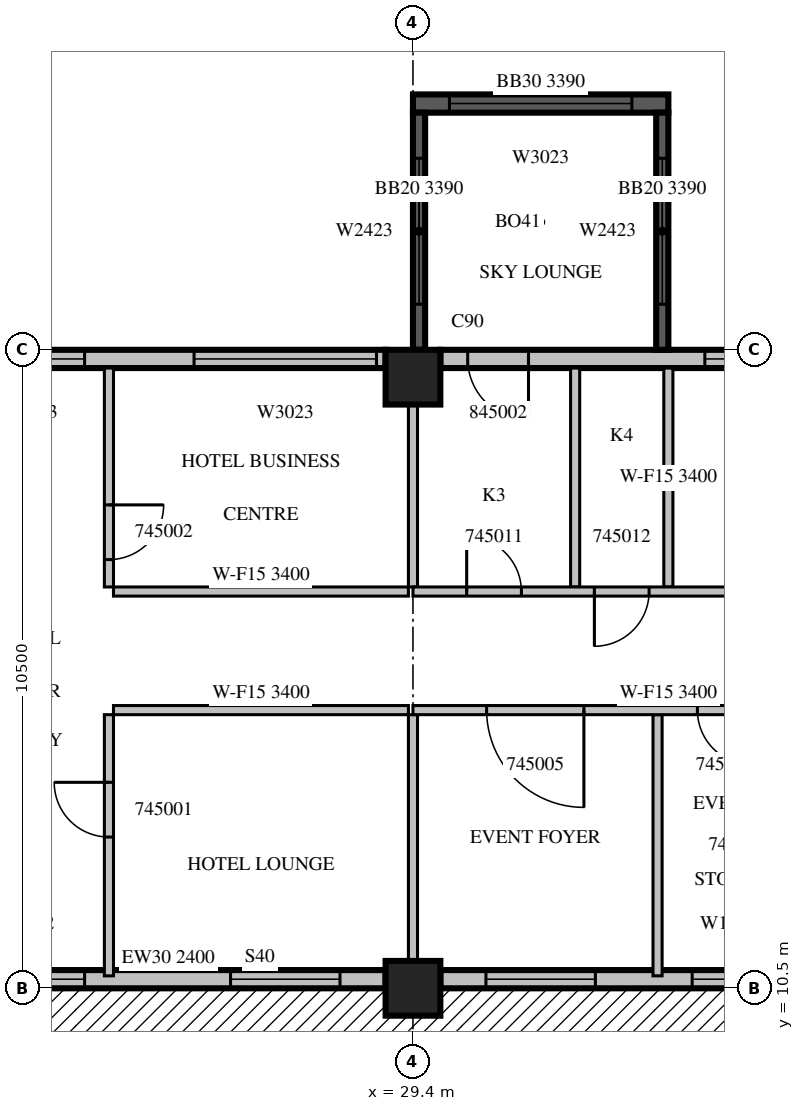
"""IFC4 building model, lengths in metres.
Left out: names, types, materials, properties, quantities, classifications, styles, units other than length and angle.
Written with IfcOpenShell. Run it as: python <this file> out.ifc"""

import sys

from ifc_helpers import new_model, si_unit, direction, frame, frame_2d, origin, origin_2d, place, context, subcontext, project, spatial, rectangle, extrude, source, transform, mapped, element, fill, save


model = new_model("IFC4")
c1 = context("Model", 3, precision=1e-05, world=origin(), true_north=direction((0.0, 1.0)))
c2 = subcontext(c1, "Body", "Model", "MODEL_VIEW")
j1 = project(units=[si_unit("LENGTHUNIT", "METRE"), si_unit("PLANEANGLEUNIT", "RADIAN")], contexts=[c1])
p1 = place(None, origin())
s1 = spatial("IfcSite", under=j1, at=p1, CompositionType="ELEMENT")
p2 = place(p1, origin())
s2 = spatial("IfcBuilding", under=s1, at=p2, CompositionType="ELEMENT")
p3 = place(p2, frame((0.0, 0.0, 204.4)))
s3 = spatial("IfcBuildingStorey", under=s2, at=p3, CompositionType="ELEMENT", Elevation=204.4)
m1 = source(origin(), c2, "Body", "SweptSolid", [
    extrude(rectangle(XDim=0.9, YDim=0.9, at=origin_2d()), origin(), (0.0, 0.0, 1.0), 3.8),
])
for number, where, z_axis, x_axis in (
    (1, (29.4, 10.5, 0.0), (0.0, 0.0, 1.0), (1.0, 0.0, 0.0)),
    (2, (29.4, 20.55, 0.0), (0.0, 0.0, 1.0), (1.0, 0.0, 0.0)),
):
    element("IfcColumn", number, at=place(p3, frame(where, z_axis=z_axis, x_axis=x_axis)), inside=s3, PredefinedType="COLUMN", context=c2, shape_type="MappedRepresentation", body=[
        mapped(m1, transform((0.0, 0.0, 0.0), scale=1.0)),
    ])
p4 = place(p3, frame((21.8, 10.65, 0.0), z_axis=(0.0, 0.0, 1.0), x_axis=(1.0, 0.0, 0.0)))
e3 = element("IfcWall", 3, at=p4, inside=s3, PredefinedType="STANDARD", context=c2, shape_type="SweptSolid", body=[
    extrude(rectangle(XDim=7.15, YDim=0.3, at=frame_2d((3.575, 0.0))), origin(), (0.0, 0.0, 1.0), 2.4),
])
m2 = source(origin(), c2, "Body", "SweptSolid", [
    extrude(rectangle(XDim=1.8, YDim=2.4, at=frame_2d((0.9, 1.2))), frame((0.0, 0.16, 0.0), z_axis=(0.0, -1.0, 0.0), x_axis=(1.0, 0.0, 0.0)), (0.0, 0.0, 1.0), 0.32),
])
p5 = place(p4, frame((0.4, 0.0, 0.0)))
e4 = element("IfcOpeningElement", 4, at=p5, cuts=e3, PredefinedType="OPENING", context=c2, shape_type="MappedRepresentation", body=[
    mapped(m2, transform((0.0, 0.0, 0.0), scale=1.0)),
])
p6 = place(p4, frame((4.6, 0.0, 0.0)))
e5 = element("IfcOpeningElement", 5, at=p6, cuts=e3, PredefinedType="OPENING", context=c2, shape_type="MappedRepresentation", body=[
    mapped(m2, transform((0.0, 0.0, 0.0), scale=1.0)),
])
m3 = source(origin(), c2, "Body", "SweptSolid", [
    extrude(rectangle(XDim=7.5, YDim=0.3, at=frame_2d((3.75, 0.0))), origin(), (0.0, 0.0, 1.0), 3.4),
])
p7 = place(p3, frame((29.85, 10.65, 0.0), z_axis=(0.0, 0.0, 1.0), x_axis=(1.0, 0.0, 0.0)))
e6 = element("IfcWall", 6, at=p7, inside=s3, PredefinedType="STANDARD", context=c2, shape_type="MappedRepresentation", body=[
    mapped(m3, transform((0.0, 0.0, 0.0), scale=1.0)),
])
p8 = place(p7, frame((0.75, 0.0, 0.0)))
e7 = element("IfcOpeningElement", 7, at=p8, cuts=e6, PredefinedType="OPENING", context=c2, shape_type="MappedRepresentation", body=[
    mapped(m2, transform((0.0, 0.0, 0.0), scale=1.0)),
])
m4 = source(origin(), c2, "Body", "SweptSolid", [
    extrude(rectangle(XDim=1.2, YDim=2.3, at=frame_2d((0.6, 1.15))), frame((0.0, 0.16, 0.0), z_axis=(0.0, -1.0, 0.0), x_axis=(1.0, 0.0, 0.0)), (0.0, 0.0, 1.0), 0.32),
])
p9 = place(p7, frame((4.141, 0.0, 0.6)))
e8 = element("IfcOpeningElement", 8, at=p9, cuts=e6, PredefinedType="OPENING", context=c2, shape_type="MappedRepresentation", body=[
    mapped(m4, transform((0.0, 0.0, 0.0), scale=1.0)),
])
p10 = place(p3, frame((37.35, 20.85, 0.0), z_axis=(0.0, 0.0, 1.0), x_axis=(-1.0, 0.0, 0.0)))
e9 = element("IfcWall", 9, at=p10, inside=s3, PredefinedType="STANDARD", context=c2, shape_type="MappedRepresentation", body=[
    mapped(m3, transform((0.0, 0.0, 0.0), scale=1.0)),
])
m5 = source(origin(), c2, "Body", "SweptSolid", [
    extrude(rectangle(XDim=3.0, YDim=2.3, at=frame_2d((1.5, 1.15))), frame((0.0, 0.16, 0.0), z_axis=(0.0, -1.0, 0.0), x_axis=(1.0, 0.0, 0.0)), (0.0, 0.0, 1.0), 0.32),
])
p11 = place(p10, frame((0.15, 0.0, 0.6)))
e10 = element("IfcOpeningElement", 10, at=p11, cuts=e9, PredefinedType="OPENING", context=c2, shape_type="MappedRepresentation", body=[
    mapped(m5, transform((0.0, 0.0, 0.0), scale=1.0)),
])
m6 = source(origin(), c2, "Body", "SweptSolid", [
    extrude(rectangle(XDim=1.0, YDim=2.1, at=frame_2d((0.5, 1.05))), frame((0.0, 0.16, 0.0), z_axis=(0.0, -1.0, 0.0), x_axis=(1.0, 0.0, 0.0)), (0.0, 0.0, 1.0), 0.32),
])
p12 = place(p10, frame((6.05, 0.0, 0.0)))
e11 = element("IfcOpeningElement", 11, at=p12, cuts=e9, PredefinedType="OPENING", context=c2, shape_type="MappedRepresentation", body=[
    mapped(m6, transform((0.0, 0.0, 0.0), scale=1.0)),
])
m7 = source(origin(), c2, "Body", "SweptSolid", [
    extrude(rectangle(XDim=7.15, YDim=0.3, at=frame_2d((3.575, 0.0))), origin(), (0.0, 0.0, 1.0), 3.4),
])
p13 = place(p3, frame((28.95, 20.85, 0.0), z_axis=(0.0, 0.0, 1.0), x_axis=(-1.0, 0.0, 0.0)))
e12 = element("IfcWall", 12, at=p13, inside=s3, PredefinedType="STANDARD", context=c2, shape_type="MappedRepresentation", body=[
    mapped(m7, transform((0.0, 0.0, 0.0), scale=1.0)),
])
p14 = place(p13, frame((0.15, 0.0, 0.6)))
e13 = element("IfcOpeningElement", 13, at=p14, cuts=e12, PredefinedType="OPENING", context=c2, shape_type="MappedRepresentation", body=[
    mapped(m5, transform((0.0, 0.0, 0.0), scale=1.0)),
])
m8 = source(origin(), c2, "Body", "SweptSolid", [
    extrude(rectangle(XDim=1.8, YDim=2.3, at=frame_2d((0.9, 1.15))), frame((0.0, 0.16, 0.0), z_axis=(0.0, -1.0, 0.0), x_axis=(1.0, 0.0, 0.0)), (0.0, 0.0, 1.0), 0.32),
])
p15 = place(p13, frame((4.95, 0.0, 0.6)))
e14 = element("IfcOpeningElement", 14, at=p15, cuts=e12, PredefinedType="OPENING", context=c2, shape_type="MappedRepresentation", body=[
    mapped(m8, transform((0.0, 0.0, 0.0), scale=1.0)),
])
m9 = source(origin(), c2, "Body", "SweptSolid", [
    extrude(rectangle(XDim=4.2, YDim=0.3, at=frame_2d((2.1, 0.0))), origin(), (0.0, 0.0, 1.0), 3.39),
])
p16 = place(p3, frame((33.6, 25.05, 0.0), z_axis=(0.0, 0.0, 1.0), x_axis=(-1.0, 0.0, 0.0)))
e15 = element("IfcWall", 15, at=p16, inside=s3, PredefinedType="SOLIDWALL", context=c2, shape_type="MappedRepresentation", body=[
    mapped(m9, transform((0.0, 0.0, 0.0), scale=1.0)),
])
p17 = place(p16, frame((0.6, 0.0, 0.6)))
e16 = element("IfcOpeningElement", 16, at=p17, cuts=e15, PredefinedType="OPENING", context=c2, shape_type="MappedRepresentation", body=[
    mapped(m5, transform((0.0, 0.0, 0.0), scale=1.0)),
])
m10 = source(origin(), c2, "Body", "SweptSolid", [
    extrude(rectangle(XDim=3.9, YDim=0.2, at=frame_2d((1.95, 0.0))), origin(), (0.0, 0.0, 1.0), 3.39),
])
p18 = place(p3, frame((33.5, 21.0, 0.0), z_axis=(0.0, 0.0, 1.0), x_axis=(0.0, 1.0, 0.0)))
e17 = element("IfcWall", 17, at=p18, inside=s3, PredefinedType="SOLIDWALL", context=c2, shape_type="MappedRepresentation", body=[
    mapped(m10, transform((0.0, 0.0, 0.0), scale=1.0)),
])
m11 = source(origin(), c2, "Body", "SweptSolid", [
    extrude(rectangle(XDim=2.4, YDim=2.3, at=frame_2d((1.2, 1.15))), frame((0.0, 0.11, 0.0), z_axis=(0.0, -1.0, 0.0), x_axis=(1.0, 0.0, 0.0)), (0.0, 0.0, 1.0), 0.22),
])
p19 = place(p18, frame((0.75, 0.0, 0.6)))
e18 = element("IfcOpeningElement", 18, at=p19, cuts=e17, PredefinedType="OPENING", context=c2, shape_type="MappedRepresentation", body=[
    mapped(m11, transform((0.0, 0.0, 0.0), scale=1.0)),
])
p20 = place(p3, frame((29.5, 21.0, 0.0), z_axis=(0.0, 0.0, 1.0), x_axis=(0.0, 1.0, 0.0)))
e19 = element("IfcWall", 19, at=p20, inside=s3, PredefinedType="SOLIDWALL", context=c2, shape_type="MappedRepresentation", body=[
    mapped(m10, transform((0.0, 0.0, 0.0), scale=1.0)),
])
p21 = place(p20, frame((0.75, 0.0, 0.6)))
e20 = element("IfcOpeningElement", 20, at=p21, cuts=e19, PredefinedType="OPENING", context=c2, shape_type="MappedRepresentation", body=[
    mapped(m11, transform((0.0, 0.0, 0.0), scale=1.0)),
])
m12 = source(origin(), c2, "Body", "SweptSolid", [
    extrude(rectangle(XDim=4.295, YDim=0.15, at=frame_2d((2.147, 0.0))), origin(), (0.0, 0.0, 1.0), 3.4),
])
p22 = place(p3, frame((24.4, 15.0, 0.0), z_axis=(0.0, 0.0, 1.0), x_axis=(0.0, -1.0, 0.0)))
e21 = element("IfcWall", 21, at=p22, inside=s3, PredefinedType="PARTITIONING", context=c2, shape_type="MappedRepresentation", body=[
    mapped(m12, transform((0.0, 0.0, 0.0), scale=1.0)),
])
m13 = source(origin(), c2, "Body", "SweptSolid", [
    extrude(rectangle(XDim=0.9, YDim=2.1, at=frame_2d((0.45, 1.05))), frame((0.0, 0.085, 0.0), z_axis=(0.0, -1.0, 0.0), x_axis=(1.0, 0.0, 0.0)), (0.0, 0.0, 1.0), 0.17),
])
p23 = place(p22, frame((1.113, 0.0, 0.0)))
e22 = element("IfcOpeningElement", 22, at=p23, cuts=e21, PredefinedType="OPENING", context=c2, shape_type="MappedRepresentation", body=[
    mapped(m13, transform((0.0, 0.0, 0.0), scale=1.0)),
])
m14 = source(origin(), c2, "Body", "SweptSolid", [
    extrude(rectangle(XDim=3.6, YDim=0.15, at=frame_2d((1.8, 0.0))), origin(), (0.0, 0.0, 1.0), 3.4),
])
p24 = place(p3, frame((24.4, 20.7, 0.0), z_axis=(0.0, 0.0, 1.0), x_axis=(0.0, -1.0, 0.0)))
e23 = element("IfcWall", 23, at=p24, inside=s3, PredefinedType="PARTITIONING", context=c2, shape_type="MappedRepresentation", body=[
    mapped(m14, transform((0.0, 0.0, 0.0), scale=1.0)),
])
p25 = place(p24, frame((2.25, 0.0, 0.0)))
e24 = element("IfcOpeningElement", 24, at=p25, cuts=e23, PredefinedType="OPENING", context=c2, shape_type="MappedRepresentation", body=[
    mapped(m13, transform((0.0, 0.0, 0.0), scale=1.0)),
])
m15 = source(origin(), c2, "Body", "SweptSolid", [
    extrude(rectangle(XDim=4.85, YDim=0.15, at=frame_2d((2.425, 0.0))), origin(), (0.0, 0.0, 1.0), 3.4),
])
for number, where, z_axis, x_axis in (
    (25, (29.325, 15.075, 0.0), (0.0, 0.0, 1.0), (-1.0, 0.0, 0.0)),
    (26, (24.475, 17.025, 0.0), (0.0, 0.0, 1.0), (1.0, 0.0, 0.0)),
):
    element("IfcWall", number, at=place(p3, frame(where, z_axis=z_axis, x_axis=x_axis)), inside=s3, PredefinedType="PARTITIONING", context=c2, shape_type="MappedRepresentation", body=[
        mapped(m15, transform((0.0, 0.0, 0.0), scale=1.0)),
    ])
m16 = source(origin(), c2, "Body", "SweptSolid", [
    extrude(rectangle(XDim=4.051, YDim=0.15, at=frame_2d((2.026, 0.0))), origin(), (0.0, 0.0, 1.0), 3.4),
])
p26 = place(p3, frame((29.4, 10.949, 0.0), z_axis=(0.0, 0.0, 1.0), x_axis=(0.0, 1.0, 0.0)))
e27 = element("IfcWall", 27, at=p26, inside=s3, PredefinedType="PARTITIONING", context=c2, shape_type="MappedRepresentation", body=[
    mapped(m16, transform((0.0, 0.0, 0.0), scale=1.0)),
])
m17 = source(origin(), c2, "Body", "SweptSolid", [
    extrude(rectangle(XDim=3.001, YDim=0.15, at=frame_2d((1.5, 0.0))), origin(), (0.0, 0.0, 1.0), 3.4),
])
p27 = place(p3, frame((29.4, 17.1, 0.0), z_axis=(0.0, 0.0, 1.0), x_axis=(0.0, 1.0, 0.0)))
e28 = element("IfcWall", 28, at=p27, inside=s3, PredefinedType="PARTITIONING", context=c2, shape_type="MappedRepresentation", body=[
    mapped(m17, transform((0.0, 0.0, 0.0), scale=1.0)),
])
p28 = place(p3, frame((33.422, 10.705, 0.0), z_axis=(0.0, 0.0, 1.0), x_axis=(0.0, 1.0, 0.0)))
e29 = element("IfcWall", 29, at=p28, inside=s3, PredefinedType="PARTITIONING", context=c2, shape_type="MappedRepresentation", body=[
    mapped(m12, transform((0.0, 0.0, 0.0), scale=1.0)),
])
for number, where, z_axis, x_axis in (
    (30, (32.067, 20.7, 0.0), (0.0, 0.0, 1.0), (0.0, -1.0, 0.0)),
    (31, (33.6, 17.1, 0.0), (0.0, 0.0, 1.0), (0.0, 1.0, 0.0)),
):
    element("IfcWall", number, at=place(p3, frame(where, z_axis=z_axis, x_axis=x_axis)), inside=s3, PredefinedType="PARTITIONING", context=c2, shape_type="MappedRepresentation", body=[
        mapped(m14, transform((0.0, 0.0, 0.0), scale=1.0)),
    ])
m18 = source(origin(), c2, "Body", "SweptSolid", [
    extrude(rectangle(XDim=8.4, YDim=0.15, at=frame_2d((4.2, 0.0))), origin(), (0.0, 0.0, 1.0), 3.4),
])
p29 = place(p3, frame((37.8, 15.075, 0.0), z_axis=(0.0, 0.0, 1.0), x_axis=(-1.0, 0.0, 0.0)))
e32 = element("IfcWall", 32, at=p29, inside=s3, PredefinedType="PARTITIONING", context=c2, shape_type="MappedRepresentation", body=[
    mapped(m18, transform((0.0, 0.0, 0.0), scale=1.0)),
])
m19 = source(origin(), c2, "Body", "SweptSolid", [
    extrude(rectangle(XDim=1.6, YDim=2.1, at=frame_2d((0.8, 1.05))), frame((0.0, 0.085, 0.0), z_axis=(0.0, -1.0, 0.0), x_axis=(1.0, 0.0, 0.0)), (0.0, 0.0, 1.0), 0.17),
])
p30 = place(p29, frame((5.589, 0.0, 0.0)))
e33 = element("IfcOpeningElement", 33, at=p30, cuts=e32, PredefinedType="OPENING", context=c2, shape_type="MappedRepresentation", body=[
    mapped(m19, transform((0.0, 0.0, 0.0), scale=1.0)),
])
p31 = place(p29, frame((2.822, 0.0, 0.0)))
e34 = element("IfcOpeningElement", 34, at=p31, cuts=e32, PredefinedType="OPENING", context=c2, shape_type="MappedRepresentation", body=[
    mapped(m13, transform((0.0, 0.0, 0.0), scale=1.0)),
])
p32 = place(p3, frame((29.4, 17.025, 0.0), z_axis=(0.0, 0.0, 1.0), x_axis=(1.0, 0.0, 0.0)))
e35 = element("IfcWall", 35, at=p32, inside=s3, PredefinedType="PARTITIONING", context=c2, shape_type="SweptSolid", body=[
    extrude(rectangle(XDim=16.8, YDim=0.15, at=frame_2d((8.4, 0.0))), origin(), (0.0, 0.0, 1.0), 3.4),
])
p33 = place(p32, frame((0.883, 0.0, 0.0)))
e36 = element("IfcOpeningElement", 36, at=p33, cuts=e35, PredefinedType="OPENING", context=c2, shape_type="MappedRepresentation", body=[
    mapped(m13, transform((0.0, 0.0, 0.0), scale=1.0)),
])
p34 = place(p32, frame((2.983, 0.0, 0.0)))
e37 = element("IfcOpeningElement", 37, at=p34, cuts=e35, PredefinedType="OPENING", context=c2, shape_type="MappedRepresentation", body=[
    mapped(m13, transform((0.0, 0.0, 0.0), scale=1.0)),
])
m20 = source(origin(), c2, "Body", "SweptSolid", [
    extrude(rectangle(XDim=1.0, YDim=2.1, at=frame_2d((0.5, 1.05))), frame((0.0, 0.085, 0.0), z_axis=(0.0, -1.0, 0.0), x_axis=(1.0, 0.0, 0.0)), (0.0, 0.0, 1.0), 0.17),
])
p35 = place(p32, frame((7.9, 0.0, 0.0)))
e38 = element("IfcOpeningElement", 38, at=p35, cuts=e35, PredefinedType="OPENING", context=c2, shape_type="MappedRepresentation", body=[
    mapped(m20, transform((0.0, 0.0, 0.0), scale=1.0)),
])
p36 = place(p32, frame((14.354, 0.0, 0.0)))
e39 = element("IfcOpeningElement", 39, at=p36, cuts=e35, PredefinedType="OPENING", context=c2, shape_type="MappedRepresentation", body=[
    mapped(m20, transform((0.0, 0.0, 0.0), scale=1.0)),
])
m21 = source(origin(), c2, "Body", "SweptSolid", [
    extrude(rectangle(XDim=1.8, YDim=2.4, at=frame_2d((0.9, 1.2))), frame((0.0, 0.025, 0.0), z_axis=(0.0, -1.0, 0.0), x_axis=(1.0, 0.0, 0.0)), (0.0, 0.0, 1.0), 0.05),
])
p37 = place(p5, origin())
e40 = element("IfcDoor", 40, at=p37, inside=s3, OperationType="SLIDING_TO_LEFT", PredefinedType="DOOR", context=c2, shape_type="MappedRepresentation", body=[
    mapped(m21, transform((0.0, 0.0, 0.0), scale=1.0)),
])
fill(e4, e40)
p38 = place(p6, origin())
e41 = element("IfcDoor", 41, at=p38, inside=s3, OperationType="SLIDING_TO_LEFT", PredefinedType="DOOR", context=c2, shape_type="MappedRepresentation", body=[
    mapped(m21, transform((0.0, 0.0, 0.0), scale=1.0)),
])
fill(e5, e41)
p39 = place(p8, origin())
e42 = element("IfcDoor", 42, at=p39, inside=s3, OperationType="SLIDING_TO_LEFT", PredefinedType="DOOR", context=c2, shape_type="MappedRepresentation", body=[
    mapped(m21, transform((0.0, 0.0, 0.0), scale=1.0)),
])
fill(e7, e42)
m22 = source(origin(), c2, "Body", "SweptSolid", [
    extrude(rectangle(XDim=1.2, YDim=2.3, at=frame_2d((0.6, 1.15))), frame((0.0, 0.03, 0.0), z_axis=(0.0, -1.0, 0.0), x_axis=(1.0, 0.0, 0.0)), (0.0, 0.0, 1.0), 0.06),
])
p40 = place(p9, origin())
e43 = element("IfcWindow", 43, at=p40, inside=s3, PartitioningType="SINGLE_PANEL", PredefinedType="WINDOW", context=c2, shape_type="MappedRepresentation", body=[
    mapped(m22, transform((0.0, 0.0, 0.0), scale=1.0)),
])
fill(e8, e43)
m23 = source(origin(), c2, "Body", "SweptSolid", [
    extrude(rectangle(XDim=3.0, YDim=2.3, at=frame_2d((1.5, 1.15))), frame((0.0, 0.03, 0.0), z_axis=(0.0, -1.0, 0.0), x_axis=(1.0, 0.0, 0.0)), (0.0, 0.0, 1.0), 0.06),
])
p41 = place(p11, origin())
e44 = element("IfcWindow", 44, at=p41, inside=s3, PartitioningType="SINGLE_PANEL", PredefinedType="WINDOW", context=c2, shape_type="MappedRepresentation", body=[
    mapped(m23, transform((0.0, 0.0, 0.0), scale=1.0)),
])
fill(e10, e44)
p42 = place(p14, origin())
e45 = element("IfcWindow", 45, at=p42, inside=s3, PartitioningType="SINGLE_PANEL", PredefinedType="WINDOW", context=c2, shape_type="MappedRepresentation", body=[
    mapped(m23, transform((0.0, 0.0, 0.0), scale=1.0)),
])
fill(e13, e45)
m24 = source(origin(), c2, "Body", "SweptSolid", [
    extrude(rectangle(XDim=1.8, YDim=2.3, at=frame_2d((0.9, 1.15))), frame((0.0, 0.03, 0.0), z_axis=(0.0, -1.0, 0.0), x_axis=(1.0, 0.0, 0.0)), (0.0, 0.0, 1.0), 0.06),
])
p43 = place(p15, origin())
e46 = element("IfcWindow", 46, at=p43, inside=s3, PartitioningType="SINGLE_PANEL", PredefinedType="WINDOW", context=c2, shape_type="MappedRepresentation", body=[
    mapped(m24, transform((0.0, 0.0, 0.0), scale=1.0)),
])
fill(e14, e46)
p44 = place(p17, origin())
e47 = element("IfcWindow", 47, at=p44, inside=s3, PartitioningType="SINGLE_PANEL", PredefinedType="WINDOW", context=c2, shape_type="MappedRepresentation", body=[
    mapped(m23, transform((0.0, 0.0, 0.0), scale=1.0)),
])
fill(e16, e47)
m25 = source(origin(), c2, "Body", "SweptSolid", [
    extrude(rectangle(XDim=2.4, YDim=2.3, at=frame_2d((1.2, 1.15))), frame((0.0, 0.03, 0.0), z_axis=(0.0, -1.0, 0.0), x_axis=(1.0, 0.0, 0.0)), (0.0, 0.0, 1.0), 0.06),
])
p45 = place(p19, origin())
e48 = element("IfcWindow", 48, at=p45, inside=s3, PartitioningType="SINGLE_PANEL", PredefinedType="WINDOW", context=c2, shape_type="MappedRepresentation", body=[
    mapped(m25, transform((0.0, 0.0, 0.0), scale=1.0)),
])
fill(e18, e48)
p46 = place(p21, origin())
e49 = element("IfcWindow", 49, at=p46, inside=s3, PartitioningType="SINGLE_PANEL", PredefinedType="WINDOW", context=c2, shape_type="MappedRepresentation", body=[
    mapped(m25, transform((0.0, 0.0, 0.0), scale=1.0)),
])
fill(e20, e49)
m26 = source(origin(), c2, "Body", "SweptSolid", [
    extrude(rectangle(XDim=0.9, YDim=2.1, at=frame_2d((0.45, 1.05))), frame((0.0, 0.025, 0.0), z_axis=(0.0, -1.0, 0.0), x_axis=(1.0, 0.0, 0.0)), (0.0, 0.0, 1.0), 0.05),
])
p47 = place(p23, origin())
e50 = element("IfcDoor", 50, at=p47, inside=s3, OperationType="SINGLE_SWING_RIGHT", PredefinedType="DOOR", context=c2, shape_type="MappedRepresentation", body=[
    mapped(m26, transform((0.0, 0.0, 0.0), scale=1.0)),
])
fill(e22, e50)
p48 = place(p25, origin())
e51 = element("IfcDoor", 51, at=p48, inside=s3, OperationType="SINGLE_SWING_LEFT", PredefinedType="DOOR", context=c2, shape_type="MappedRepresentation", body=[
    mapped(m26, transform((0.0, 0.0, 0.0), scale=1.0)),
])
fill(e24, e51)
m27 = source(origin(), c2, "Body", "SweptSolid", [
    extrude(rectangle(XDim=1.6, YDim=2.1, at=frame_2d((0.8, 1.05))), frame((0.0, 0.025, 0.0), z_axis=(0.0, -1.0, 0.0), x_axis=(1.0, 0.0, 0.0)), (0.0, 0.0, 1.0), 0.05),
])
p49 = place(p30, origin())
e52 = element("IfcDoor", 52, at=p49, inside=s3, OperationType="SINGLE_SWING_LEFT", PredefinedType="DOOR", context=c2, shape_type="MappedRepresentation", body=[
    mapped(m27, transform((0.0, 0.0, 0.0), scale=1.0)),
])
fill(e33, e52)
p50 = place(p31, origin())
e53 = element("IfcDoor", 53, at=p50, inside=s3, OperationType="SINGLE_SWING_LEFT", PredefinedType="DOOR", context=c2, shape_type="MappedRepresentation", body=[
    mapped(m26, transform((0.0, 0.0, 0.0), scale=1.0)),
])
fill(e34, e53)
p51 = place(p33, origin())
e54 = element("IfcDoor", 54, at=p51, inside=s3, OperationType="SINGLE_SWING_LEFT", PredefinedType="DOOR", context=c2, shape_type="MappedRepresentation", body=[
    mapped(m26, transform((0.0, 0.0, 0.0), scale=1.0)),
])
fill(e36, e54)
p52 = place(p34, origin())
e55 = element("IfcDoor", 55, at=p52, inside=s3, OperationType="SINGLE_SWING_RIGHT", PredefinedType="DOOR", context=c2, shape_type="MappedRepresentation", body=[
    mapped(m26, transform((0.0, 0.0, 0.0), scale=1.0)),
])
fill(e37, e55)
m28 = source(origin(), c2, "Body", "SweptSolid", [
    extrude(rectangle(XDim=1.0, YDim=2.1, at=frame_2d((0.5, 1.05))), frame((0.0, 0.025, 0.0), z_axis=(0.0, -1.0, 0.0), x_axis=(1.0, 0.0, 0.0)), (0.0, 0.0, 1.0), 0.05),
])
p53 = place(p12, origin())
e56 = element("IfcDoor", 56, at=p53, inside=s3, OperationType="SINGLE_SWING_LEFT", PredefinedType="DOOR", context=c2, shape_type="MappedRepresentation", body=[
    mapped(m28, transform((0.0, 0.0, 0.0), scale=1.0)),
])
fill(e11, e56)
save(model, sys.argv[1])
